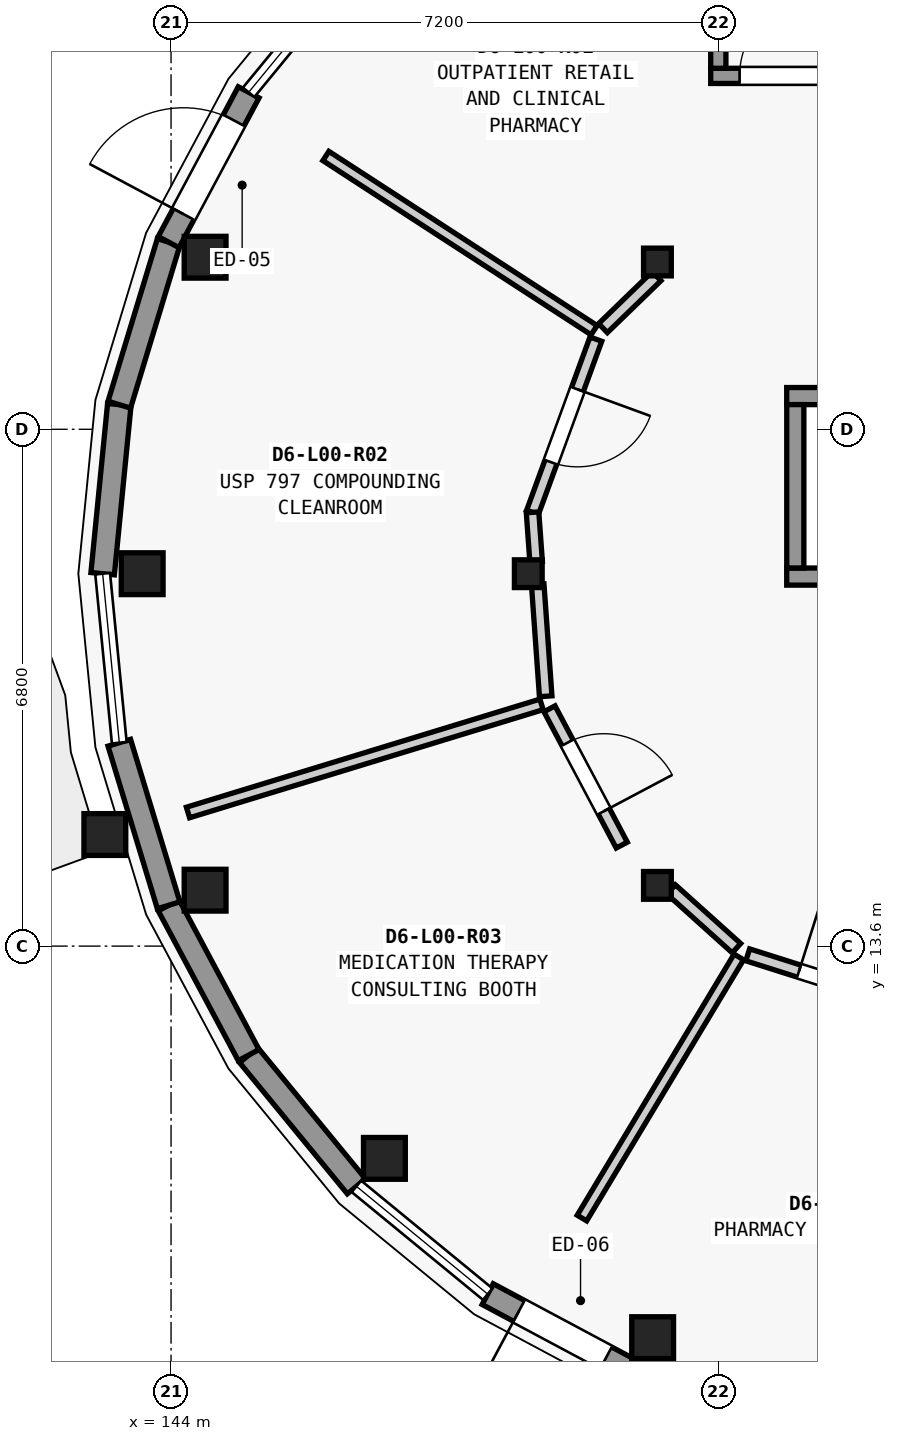
"""IFC4 building model, lengths in metres.
Left out: names, types, materials, properties, quantities, classifications, styles, units other than length and angle.
Written with IfcOpenShell. Run it as: python <this file> out.ifc"""

import sys

from ifc_helpers import new_model, si_unit, direction, frame, frame_2d, origin, origin_2d, place, context, subcontext, project, spatial, rectangle, circle, extrude, element, fill, save


model = new_model("IFC4")
c1 = context("Model", 3, precision=1e-05, world=origin(), true_north=direction((0.0, 1.0)))
c2 = subcontext(c1, "Body", "Model", "MODEL_VIEW")
j1 = project(units=[si_unit("LENGTHUNIT", "METRE"), si_unit("PLANEANGLEUNIT", "RADIAN")], contexts=[c1])
p1 = place(None, origin())
s1 = spatial("IfcSite", under=j1, at=p1, CompositionType="ELEMENT")
p2 = place(p1, origin())
s2 = spatial("IfcBuilding", under=s1, at=p2, CompositionType="ELEMENT")
p3 = place(p2, origin())
s3 = spatial("IfcBuildingStorey", under=s2, at=p3, CompositionType="ELEMENT", Elevation=0.0)
for number, where, z_axis, x_axis in (
    (1, (144.448, 22.664, 0.0), (0.0, 0.0, 1.0), (1.0, 0.0, 0.0)),
    (2, (143.62, 18.5, 0.0), (0.0, 0.0, 1.0), (1.0, 0.0, 0.0)),
    (3, (144.448, 14.336, 0.0), (0.0, 0.0, 1.0), (1.0, 0.0, 0.0)),
    (4, (146.807, 10.807, 0.0), (0.0, 0.0, 1.0), (1.0, 0.0, 0.0)),
    (5, (150.336, 8.448, 0.0), (0.0, 0.0, 1.0), (1.0, 0.0, 0.0)),
):
    element("IfcColumn", number, at=place(p3, frame(where, z_axis=z_axis, x_axis=x_axis)), inside=s3, PredefinedType="PILASTER", context=c2, shape_type="SweptSolid", body=[
        extrude(circle(Radius=0.275, at=origin_2d()), origin(), (0.0, 0.0, 1.0), 4.55),
    ])
for number, where, z_axis, x_axis in (
    (6, (150.399, 22.601, 0.0), (0.0, 0.0, 1.0), (1.0, 0.0, 0.0)),
    (7, (148.7, 18.5, 0.0), (0.0, 0.0, 1.0), (1.0, 0.0, 0.0)),
    (8, (150.399, 14.399, 0.0), (0.0, 0.0, 1.0), (1.0, 0.0, 0.0)),
):
    element("IfcColumn", number, at=place(p3, frame(where, z_axis=z_axis, x_axis=x_axis)), inside=s3, PredefinedType="COLUMN", context=c2, shape_type="SweptSolid", body=[
        extrude(rectangle(XDim=0.365, YDim=0.365, at=origin_2d()), origin(), (0.0, 0.0, 1.0), 4.55),
    ])
p4 = place(p3, frame((143.129, 15.068, 0.0), z_axis=(0.0, 0.0, 1.0), x_axis=(1.0, 0.0, 0.0)))
e9 = element("IfcColumn", 9, at=p4, inside=s3, PredefinedType="PILASTER", context=c2, shape_type="SweptSolid", body=[
    extrude(circle(Radius=0.275, at=origin_2d()), origin(), (0.0, 0.0, 1.0), 4.55),
])
p5 = place(p3, frame((150.137, 7.968, 0.0), z_axis=(0.0, 0.0, 1.0), x_axis=(-0.882017012185, 0.471217561446, 0.0)))
e10 = element("IfcWall", 10, at=p5, inside=s3, PredefinedType="SOLIDWALL", context=c2, shape_type="SweptSolid", body=[
    extrude(rectangle(XDim=2.235, YDim=0.31, at=frame_2d((1.117, 0.0))), origin(), (0.0, 0.0, 1.0), 3.659),
])
p6 = place(p5, frame((0.467, 0.0, 0.0)))
e11 = element("IfcOpeningElement", 11, at=p6, cuts=e10, PredefinedType="OPENING", context=c2, shape_type="SweptSolid", body=[
    extrude(rectangle(XDim=1.3, YDim=2.25, at=frame_2d((0.65, 1.125))), frame((0.0, 0.165, 0.0), z_axis=(0.0, -1.0, 0.0), x_axis=(1.0, 0.0, 0.0)), (0.0, 0.0, 1.0), 0.33),
])
for number, where, z_axis, x_axis in (
    (12, (146.439, 10.439, 0.0), (0.0, 0.0, 1.0), (-0.635, 0.773, 0.0)),
    (13, (145.021, 12.166, 0.0), (0.0, 0.0, 1.0), (-0.471, 0.882, 0.0)),
):
    element("IfcWall", number, at=place(p3, frame(where, z_axis=z_axis, x_axis=x_axis)), inside=s3, PredefinedType="SOLIDWALL", context=c2, shape_type="SweptSolid", body=[
        extrude(rectangle(XDim=2.235, YDim=0.31, at=frame_2d((1.117, 0.0))), origin(), (0.0, 0.0, 1.0), 3.659),
    ])
p7 = place(p3, frame((143.968, 14.137, 0.0), z_axis=(0.0, 0.0, 1.0), x_axis=(-0.290322655883, 0.956928814218, 0.0)))
e14 = element("IfcWall", 14, at=p7, inside=s3, PredefinedType="SOLIDWALL", context=c2, shape_type="SweptSolid", body=[
    extrude(rectangle(XDim=2.235, YDim=0.31, at=frame_2d((1.118, 0.0))), origin(), (0.0, 0.0, 1.0), 3.659),
])
p8 = place(p3, frame((143.1, 18.5, 0.0), z_axis=(0.0, 0.0, 1.0), x_axis=(0.097989369151, 0.995187461503, 0.0)))
e15 = element("IfcWall", 15, at=p8, inside=s3, PredefinedType="SOLIDWALL", context=c2, shape_type="SweptSolid", body=[
    extrude(rectangle(XDim=2.235, YDim=0.31, at=frame_2d((1.117, 0.0))), origin(), (0.0, 0.0, 1.0), 3.659),
])
p9 = place(p3, frame((143.319, 20.724, 0.0), z_axis=(0.0, 0.0, 1.0), x_axis=(0.290322655883, 0.956928814218, 0.0)))
e16 = element("IfcWall", 16, at=p9, inside=s3, PredefinedType="SOLIDWALL", context=c2, shape_type="SweptSolid", body=[
    extrude(rectangle(XDim=2.235, YDim=0.31, at=frame_2d((1.118, 0.0))), origin(), (0.0, 0.0, 1.0), 3.659),
])
p10 = place(p3, frame((143.968, 22.863, 0.0), z_axis=(0.0, 0.0, 1.0), x_axis=(0.471217561446, 0.882017012185, 0.0)))
e17 = element("IfcWall", 17, at=p10, inside=s3, PredefinedType="SOLIDWALL", context=c2, shape_type="SweptSolid", body=[
    extrude(rectangle(XDim=2.235, YDim=0.31, at=frame_2d((1.117, 0.0))), origin(), (0.0, 0.0, 1.0), 3.659),
])
p11 = place(p10, frame((0.417, 0.0, 0.0)))
e18 = element("IfcOpeningElement", 18, at=p11, cuts=e17, PredefinedType="OPENING", context=c2, shape_type="SweptSolid", body=[
    extrude(rectangle(XDim=1.4, YDim=2.3, at=frame_2d((0.7, 1.15))), frame((0.0, 0.165, 0.0), z_axis=(0.0, -1.0, 0.0), x_axis=(1.0, 0.0, 0.0)), (0.0, 0.0, 1.0), 0.33),
])
p12 = place(p3, frame((151.1, 25.05, 0.0), z_axis=(0.0, 0.0, 1.0), x_axis=(1.0, 0.0, 0.0)))
e19 = element("IfcWall", 19, at=p12, inside=s3, PredefinedType="SHEAR", context=c2, shape_type="SweptSolid", body=[
    extrude(rectangle(XDim=6.8, YDim=0.2, at=frame_2d((3.4, 0.0))), origin(), (0.0, 0.0, 1.0), 4.305),
])
p13 = place(p12, frame((0.38, 0.0, 0.0)))
e20 = element("IfcOpeningElement", 20, at=p13, cuts=e19, PredefinedType="OPENING", context=c2, shape_type="SweptSolid", body=[
    extrude(rectangle(XDim=1.05, YDim=2.15, at=frame_2d((0.525, 1.075))), frame((0.0, 0.11, 0.0), z_axis=(0.0, -1.0, 0.0), x_axis=(1.0, 0.0, 0.0)), (0.0, 0.0, 1.0), 0.22),
])
p14 = place(p3, frame((151.2, 25.15, 0.0), z_axis=(0.0, 0.0, 1.0), x_axis=(0.0, 1.0, 0.0)))
e21 = element("IfcWall", 21, at=p14, inside=s3, PredefinedType="SHEAR", context=c2, shape_type="SweptSolid", body=[
    extrude(rectangle(XDim=2.9, YDim=0.2, at=frame_2d((1.45, 0.0))), origin(), (0.0, 0.0, 1.0), 4.305),
])
p15 = place(p3, frame((152.1, 18.462, 0.0), z_axis=(0.0, 0.0, 1.0), x_axis=(1.0, 0.0, 0.0)))
e22 = element("IfcWall", 22, at=p15, inside=s3, PredefinedType="SHEAR", context=c2, shape_type="SweptSolid", body=[
    extrude(rectangle(XDim=3.1, YDim=0.225, at=frame_2d((1.55, 0.0))), origin(), (0.0, 0.0, 1.0), 4.305),
])
p16 = place(p15, frame((0.95, 0.0, 0.0)))
e23 = element("IfcOpeningElement", 23, at=p16, cuts=e22, PredefinedType="OPENING", context=c2, shape_type="SweptSolid", body=[
    extrude(rectangle(XDim=1.2, YDim=2.2, at=frame_2d((0.6, 1.1))), frame((0.0, 0.123, 0.0), z_axis=(0.0, -1.0, 0.0), x_axis=(1.0, 0.0, 0.0)), (0.0, 0.0, 1.0), 0.245),
])
p17 = place(p3, frame((152.1, 20.837, 0.0), z_axis=(0.0, 0.0, 1.0), x_axis=(1.0, 0.0, 0.0)))
e24 = element("IfcWall", 24, at=p17, inside=s3, PredefinedType="SHEAR", context=c2, shape_type="SweptSolid", body=[
    extrude(rectangle(XDim=3.1, YDim=0.225, at=frame_2d((1.55, 0.0))), origin(), (0.0, 0.0, 1.0), 4.305),
])
p18 = place(p3, frame((152.213, 18.575, 0.0), z_axis=(0.0, 0.0, 1.0), x_axis=(0.0, 1.0, 0.0)))
e25 = element("IfcWall", 25, at=p18, inside=s3, PredefinedType="SHEAR", context=c2, shape_type="SweptSolid", body=[
    extrude(rectangle(XDim=2.15, YDim=0.225, at=frame_2d((1.075, 0.0))), origin(), (0.0, 0.0, 1.0), 4.305),
])
p19 = place(p3, frame((149.566, 21.704, 0.0), z_axis=(0.0, 0.0, 1.0), x_axis=(-0.838631802298, 0.544698724227, 0.0)))
e26 = element("IfcWall", 26, at=p19, inside=s3, PredefinedType="PARTITIONING", context=c2, shape_type="SweptSolid", body=[
    extrude(rectangle(XDim=4.208, YDim=0.145, at=frame_2d((2.104, 0.0))), origin(), (0.0, 0.0, 1.0), 3.634),
])
p20 = place(p3, frame((148.874, 16.78, 0.0), z_axis=(0.0, 0.0, 1.0), x_axis=(-0.956297390361, -0.292395795436, 0.0)))
e27 = element("IfcWall", 27, at=p20, inside=s3, PredefinedType="PARTITIONING", context=c2, shape_type="SweptSolid", body=[
    extrude(rectangle(XDim=4.864, YDim=0.145, at=frame_2d((2.432, 0.0))), origin(), (0.0, 0.0, 1.0), 3.634),
])
p21 = place(p3, frame((151.47, 13.457, 0.0), z_axis=(0.0, 0.0, 1.0), x_axis=(-0.515033199945, -0.857170229858, 0.0)))
e28 = element("IfcWall", 28, at=p21, inside=s3, PredefinedType="PARTITIONING", context=c2, shape_type="SweptSolid", body=[
    extrude(rectangle(XDim=4.007, YDim=0.145, at=frame_2d((2.004, 0.0))), origin(), (0.0, 0.0, 1.0), 3.634),
])
p22 = place(p3, frame((150.388, 22.414, 0.0), z_axis=(0.0, 0.0, 1.0), x_axis=(-0.718088711181, -0.69595158084, 0.0)))
e29 = element("IfcWall", 29, at=p22, inside=s3, PredefinedType="PARTITIONING", context=c2, shape_type="SweptSolid", body=[
    extrude(rectangle(XDim=0.981, YDim=0.165, at=frame_2d((0.491, 0.0))), origin(), (0.0, 0.0, 1.0), 3.634),
])
p23 = place(p3, frame((149.589, 21.586, 0.0), z_axis=(0.0, 0.0, 1.0), x_axis=(-0.343293663048, -0.93922811974, 0.0)))
e30 = element("IfcWall", 30, at=p23, inside=s3, PredefinedType="PARTITIONING", context=c2, shape_type="SweptSolid", body=[
    extrude(rectangle(XDim=2.427, YDim=0.165, at=frame_2d((1.213, 0.0))), origin(), (0.0, 0.0, 1.0), 3.634),
])
p24 = place(p23, frame((0.703, 0.0, 0.0)))
e31 = element("IfcOpeningElement", 31, at=p24, cuts=e30, PredefinedType="OPENING", context=c2, shape_type="SweptSolid", body=[
    extrude(rectangle(XDim=1.02, YDim=2.2, at=frame_2d((0.51, 1.1))), frame((0.0, 0.093, 0.0), z_axis=(0.0, -1.0, 0.0), x_axis=(1.0, 0.0, 0.0)), (0.0, 0.0, 1.0), 0.185),
])
p25 = place(p3, frame((148.756, 19.307, 0.0), z_axis=(0.0, 0.0, 1.0), x_axis=(0.071939342489, -0.997409008884, 0.0)))
e32 = element("IfcWall", 32, at=p25, inside=s3, PredefinedType="PARTITIONING", context=c2, shape_type="SweptSolid", body=[
    extrude(rectangle(XDim=0.652, YDim=0.165, at=frame_2d((0.326, 0.0))), origin(), (0.0, 0.0, 1.0), 3.634),
])
p26 = place(p3, frame((148.824, 18.36, 0.0), z_axis=(0.0, 0.0, 1.0), x_axis=(0.071082579823, -0.997470434071, 0.0)))
e33 = element("IfcWall", 33, at=p26, inside=s3, PredefinedType="PARTITIONING", context=c2, shape_type="SweptSolid", body=[
    extrude(rectangle(XDim=1.477, YDim=0.165, at=frame_2d((0.738, 0.0))), origin(), (0.0, 0.0, 1.0), 3.634),
])
p27 = place(p3, frame((148.979, 16.722, 0.0), z_axis=(0.0, 0.0, 1.0), x_axis=(0.468545306674, -0.883439469117, 0.0)))
e34 = element("IfcWall", 34, at=p27, inside=s3, PredefinedType="PARTITIONING", context=c2, shape_type="SweptSolid", body=[
    extrude(rectangle(XDim=2.03, YDim=0.165, at=frame_2d((1.015, 0.0))), origin(), (0.0, 0.0, 1.0), 3.634),
])
p28 = place(p27, frame((0.505, 0.0, 0.0)))
e35 = element("IfcOpeningElement", 35, at=p28, cuts=e34, PredefinedType="OPENING", context=c2, shape_type="SweptSolid", body=[
    extrude(rectangle(XDim=1.02, YDim=2.2, at=frame_2d((0.51, 1.1))), frame((0.0, 0.093, 0.0), z_axis=(0.0, -1.0, 0.0), x_axis=(1.0, 0.0, 0.0)), (0.0, 0.0, 1.0), 0.185),
])
p29 = place(p3, frame((150.579, 14.346, 0.0), z_axis=(0.0, 0.0, 1.0), x_axis=(0.743692994732, -0.668521300773, 0.0)))
e36 = element("IfcWall", 36, at=p29, inside=s3, PredefinedType="PARTITIONING", context=c2, shape_type="SweptSolid", body=[
    extrude(rectangle(XDim=1.156, YDim=0.165, at=frame_2d((0.578, 0.0))), origin(), (0.0, 0.0, 1.0), 3.634),
])
p30 = place(p3, frame((151.587, 13.485, 0.0), z_axis=(0.0, 0.0, 1.0), x_axis=(0.953231317115, -0.302241717953, 0.0)))
e37 = element("IfcWall", 37, at=p30, inside=s3, PredefinedType="PARTITIONING", context=c2, shape_type="SweptSolid", body=[
    extrude(rectangle(XDim=2.525, YDim=0.165, at=frame_2d((1.263, 0.0))), origin(), (0.0, 0.0, 1.0), 3.634),
])
p31 = place(p30, frame((0.708, 0.0, 0.0)))
e38 = element("IfcOpeningElement", 38, at=p31, cuts=e37, PredefinedType="OPENING", context=c2, shape_type="SweptSolid", body=[
    extrude(rectangle(XDim=1.11, YDim=2.25, at=frame_2d((0.555, 1.125))), frame((0.0, 0.093, 0.0), z_axis=(0.0, -1.0, 0.0), x_axis=(1.0, 0.0, 0.0)), (0.0, 0.0, 1.0), 0.185),
])
p32 = place(p6, origin())
e39 = element("IfcDoor", 39, at=p32, inside=s3, OperationType="SINGLE_SWING_RIGHT", PredefinedType="DOOR", context=c2, shape_type="SweptSolid", body=[
    extrude(rectangle(XDim=1.3, YDim=2.25, at=frame_2d((0.65, 1.125))), frame((0.0, 0.025, 0.0), z_axis=(0.0, -1.0, 0.0), x_axis=(1.0, 0.0, 0.0)), (0.0, 0.0, 1.0), 0.05),
])
fill(e11, e39)
p33 = place(p11, origin())
e40 = element("IfcDoor", 40, at=p33, inside=s3, OperationType="SINGLE_SWING_LEFT", PredefinedType="DOOR", context=c2, shape_type="SweptSolid", body=[
    extrude(rectangle(XDim=1.4, YDim=2.3, at=frame_2d((0.7, 1.15))), frame((0.0, 0.025, 0.0), z_axis=(0.0, -1.0, 0.0), x_axis=(1.0, 0.0, 0.0)), (0.0, 0.0, 1.0), 0.05),
])
fill(e18, e40)
p34 = place(p13, origin())
e41 = element("IfcDoor", 41, at=p34, inside=s3, OperationType="SINGLE_SWING_RIGHT", PredefinedType="DOOR", context=c2, shape_type="SweptSolid", body=[
    extrude(rectangle(XDim=1.05, YDim=2.15, at=frame_2d((0.525, 1.075))), frame((0.0, 0.025, 0.0), z_axis=(0.0, -1.0, 0.0), x_axis=(1.0, 0.0, 0.0)), (0.0, 0.0, 1.0), 0.05),
])
fill(e20, e41)
p35 = place(p24, origin())
e42 = element("IfcDoor", 42, at=p35, inside=s3, OperationType="SINGLE_SWING_LEFT", PredefinedType="DOOR", context=c2, shape_type="SweptSolid", body=[
    extrude(rectangle(XDim=1.02, YDim=2.2, at=frame_2d((0.51, 1.1))), frame((0.0, 0.025, 0.0), z_axis=(0.0, -1.0, 0.0), x_axis=(1.0, 0.0, 0.0)), (0.0, 0.0, 1.0), 0.05),
])
fill(e31, e42)
p36 = place(p28, origin())
e43 = element("IfcDoor", 43, at=p36, inside=s3, OperationType="SINGLE_SWING_RIGHT", PredefinedType="DOOR", context=c2, shape_type="SweptSolid", body=[
    extrude(rectangle(XDim=1.02, YDim=2.2, at=frame_2d((0.51, 1.1))), frame((0.0, 0.025, 0.0), z_axis=(0.0, -1.0, 0.0), x_axis=(1.0, 0.0, 0.0)), (0.0, 0.0, 1.0), 0.05),
])
fill(e35, e43)
p37 = place(p31, origin())
e44 = element("IfcDoor", 44, at=p37, inside=s3, OperationType="SINGLE_SWING_LEFT", PredefinedType="DOOR", context=c2, shape_type="SweptSolid", body=[
    extrude(rectangle(XDim=1.11, YDim=2.25, at=frame_2d((0.555, 1.125))), frame((0.0, 0.025, 0.0), z_axis=(0.0, -1.0, 0.0), x_axis=(1.0, 0.0, 0.0)), (0.0, 0.0, 1.0), 0.05),
])
fill(e38, e44)
save(model, sys.argv[1])
